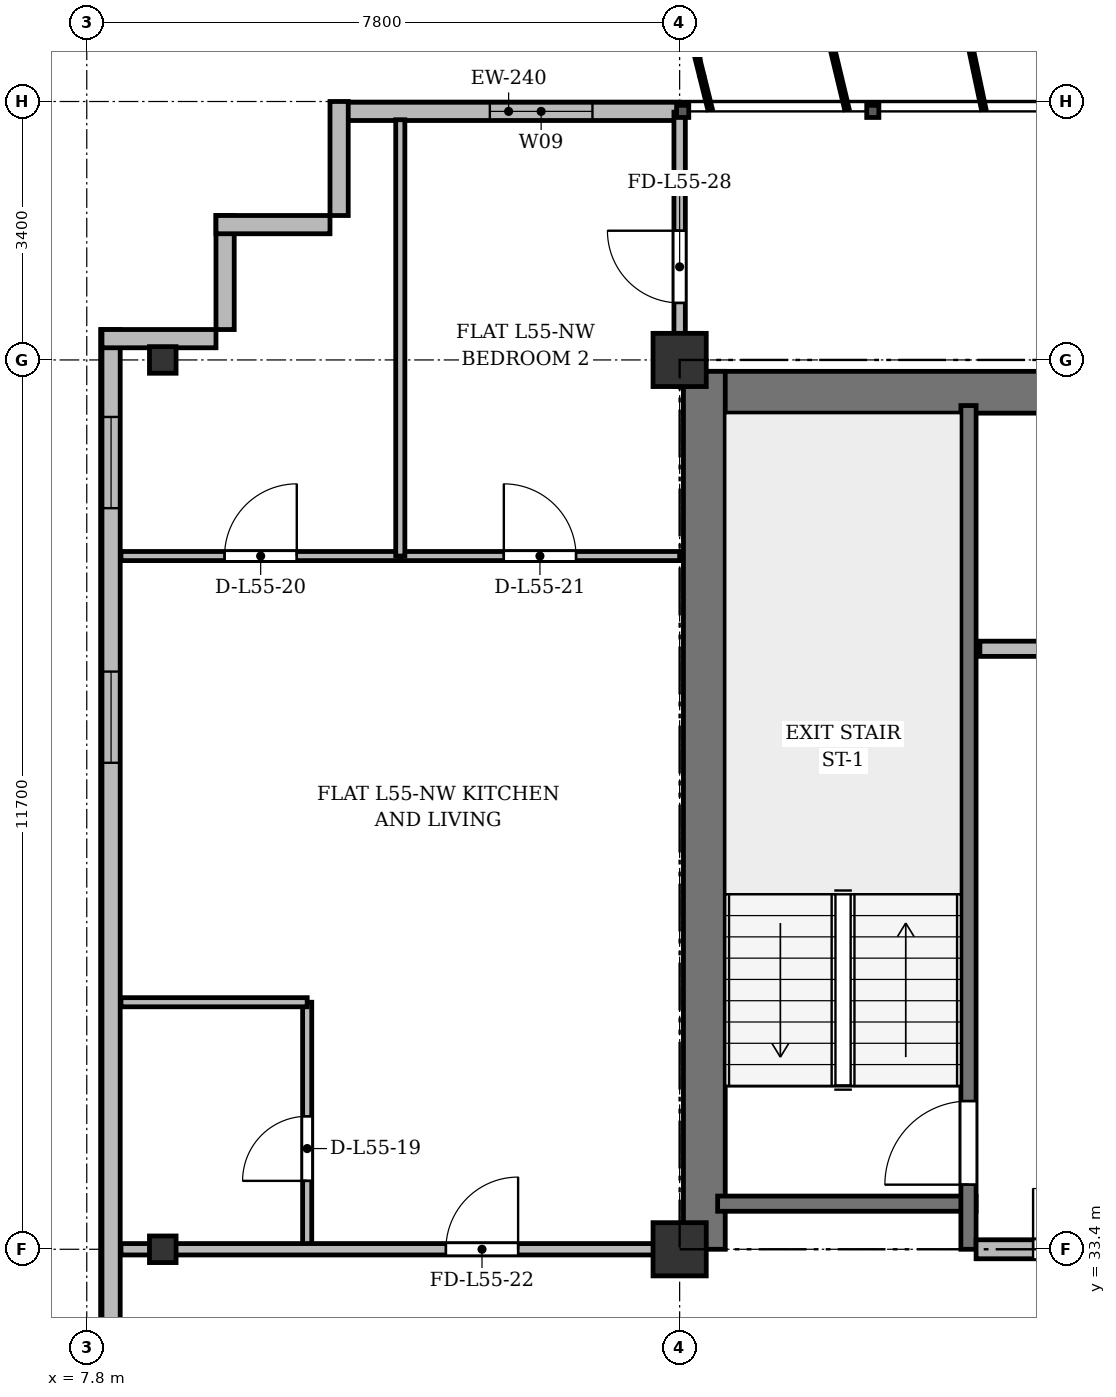
"""IFC4 building model, lengths in metres.
Left out: names, types, materials, properties, quantities, classifications, styles, units other than length and angle.
Written with IfcOpenShell. Run it as: python <this file> out.ifc"""

import sys

from ifc_helpers import new_model, si_unit, direction, frame, frame_2d, origin, origin_2d, place, context, subcontext, project, spatial, rectangle, i_section, extrude, source, transform, mapped, element, fill, save


model = new_model("IFC4")
c1 = context("Model", 3, precision=1e-05, world=origin(), true_north=direction((0.0, 1.0)))
c2 = subcontext(c1, "Body", "Model", "MODEL_VIEW")
j1 = project(units=[si_unit("LENGTHUNIT", "METRE"), si_unit("PLANEANGLEUNIT", "RADIAN")], contexts=[c1])
p1 = place(None, origin())
s1 = spatial("IfcSite", under=j1, at=p1, CompositionType="ELEMENT")
p2 = place(p1, origin())
s2 = spatial("IfcBuilding", under=s1, at=p2, CompositionType="ELEMENT")
p3 = place(p2, frame((0.0, 0.0, 212.1)))
s3 = spatial("IfcBuildingStorey", under=s2, at=p3, CompositionType="ELEMENT", Elevation=212.1)
m1 = source(origin(), c2, "Body", "SweptSolid", [
    extrude(i_section(OverallWidth=0.35, OverallDepth=0.35, WebThickness=0.018, FlangeThickness=0.028, at=origin_2d()), origin(), (0.0, 0.0, 1.0), 3.6),
])
for number, where, z_axis, x_axis in (
    (1, (8.8, 33.4, 0.0), (0.0, 0.0, 1.0), (1.0, 0.0, 0.0)),
    (2, (8.8, 45.1, 0.0), (0.0, 0.0, 1.0), (1.0, 0.0, 0.0)),
):
    element("IfcColumn", number, at=place(p3, frame(where, z_axis=z_axis, x_axis=x_axis)), inside=s3, PredefinedType="COLUMN", context=c2, shape_type="MappedRepresentation", body=[
        mapped(m1, transform((0.0, 0.0, 0.0), x_axis=(1.0, 0.0, 0.0), y_axis=(0.0, 1.0, 0.0), z_axis=(0.0, 0.0, 1.0), scale=1.0)),
    ])
m2 = source(origin(), c2, "Body", "SweptSolid", [
    extrude(rectangle(XDim=0.7, YDim=0.7, at=origin_2d()), origin(), (0.0, 0.0, 1.0), 3.6),
])
for number, where, z_axis, x_axis in (
    (3, (15.6, 33.4, 0.0), (0.0, 0.0, 1.0), (1.0, 0.0, 0.0)),
    (4, (15.6, 45.1, 0.0), (0.0, 0.0, 1.0), (1.0, 0.0, 0.0)),
):
    element("IfcColumn", number, at=place(p3, frame(where, z_axis=z_axis, x_axis=x_axis)), inside=s3, PredefinedType="COLUMN", context=c2, shape_type="MappedRepresentation", body=[
        mapped(m2, transform((0.0, 0.0, 0.0), x_axis=(1.0, 0.0, 0.0), y_axis=(0.0, 1.0, 0.0), z_axis=(0.0, 0.0, 1.0), scale=1.0)),
    ])
p4 = place(p3, frame((11.1, 48.37, 0.0), z_axis=(0.0, 0.0, 1.0), x_axis=(1.0, 0.0, 0.0)))
e5 = element("IfcWall", 5, at=p4, inside=s3, PredefinedType="SOLIDWALL", context=c2, shape_type="SweptSolid", body=[
    extrude(rectangle(XDim=4.5, YDim=0.24, at=frame_2d((2.25, 0.0))), origin(), (0.0, 0.0, 1.0), 3.36),
])
p5 = place(p4, frame((2.003, 0.0, 0.9)))
e6 = element("IfcOpeningElement", 6, at=p5, cuts=e5, PredefinedType="OPENING", context=c2, shape_type="SweptSolid", body=[
    extrude(rectangle(XDim=1.35, YDim=1.5, at=frame_2d((0.675, 0.75))), frame((0.0, 0.13, 0.0), z_axis=(0.0, -1.0, 0.0), x_axis=(1.0, 0.0, 0.0)), (0.0, 0.0, 1.0), 0.26),
])
p6 = place(p3, frame((8.12, 6.4, 0.0), z_axis=(0.0, 0.0, 1.0), x_axis=(0.0, 1.0, 0.0)))
e7 = element("IfcWall", 7, at=p6, inside=s3, PredefinedType="SOLIDWALL", context=c2, shape_type="SweptSolid", body=[
    extrude(rectangle(XDim=39.1, YDim=0.24, at=frame_2d((19.55, 0.0))), origin(), (0.0, 0.0, 1.0), 3.36),
])
p7 = place(p6, frame((1.45, 0.0, 0.92)))
e8 = element("IfcOpeningElement", 8, at=p7, cuts=e7, PredefinedType="OPENING", context=c2, shape_type="SweptSolid", body=[
    extrude(rectangle(XDim=1.2, YDim=1.65, at=frame_2d((0.6, 0.825))), frame((0.0, 0.13, 0.0), z_axis=(0.0, -1.0, 0.0), x_axis=(1.0, 0.0, 0.0)), (0.0, 0.0, 1.0), 0.26),
])
p8 = place(p6, frame((3.8, 0.0, 0.92)))
e9 = element("IfcOpeningElement", 9, at=p8, cuts=e7, PredefinedType="OPENING", context=c2, shape_type="SweptSolid", body=[
    extrude(rectangle(XDim=2.4, YDim=2.1, at=frame_2d((1.2, 1.05))), frame((0.0, 0.13, 0.0), z_axis=(0.0, -1.0, 0.0), x_axis=(1.0, 0.0, 0.0)), (0.0, 0.0, 1.0), 0.26),
])
p9 = place(p6, frame((8.0, 0.0, 0.92)))
e10 = element("IfcOpeningElement", 10, at=p9, cuts=e7, PredefinedType="OPENING", context=c2, shape_type="SweptSolid", body=[
    extrude(rectangle(XDim=2.4, YDim=2.1, at=frame_2d((1.2, 1.05))), frame((0.0, 0.13, 0.0), z_axis=(0.0, -1.0, 0.0), x_axis=(1.0, 0.0, 0.0)), (0.0, 0.0, 1.0), 0.26),
])
p10 = place(p6, frame((15.2, 0.0, 0.92)))
e11 = element("IfcOpeningElement", 11, at=p10, cuts=e7, PredefinedType="OPENING", context=c2, shape_type="SweptSolid", body=[
    extrude(rectangle(XDim=2.4, YDim=2.1, at=frame_2d((1.2, 1.05))), frame((0.0, 0.13, 0.0), z_axis=(0.0, -1.0, 0.0), x_axis=(1.0, 0.0, 0.0)), (0.0, 0.0, 1.0), 0.26),
])
p11 = place(p6, frame((33.4, 0.0, 0.92)))
e12 = element("IfcOpeningElement", 12, at=p11, cuts=e7, PredefinedType="OPENING", context=c2, shape_type="SweptSolid", body=[
    extrude(rectangle(XDim=1.2, YDim=1.65, at=frame_2d((0.6, 0.825))), frame((0.0, 0.13, 0.0), z_axis=(0.0, -1.0, 0.0), x_axis=(1.0, 0.0, 0.0)), (0.0, 0.0, 1.0), 0.26),
])
p12 = place(p6, frame((36.75, 0.0, 0.92)))
e13 = element("IfcOpeningElement", 13, at=p12, cuts=e7, PredefinedType="OPENING", context=c2, shape_type="SweptSolid", body=[
    extrude(rectangle(XDim=1.2, YDim=1.65, at=frame_2d((0.6, 0.825))), frame((0.0, 0.13, 0.0), z_axis=(0.0, -1.0, 0.0), x_axis=(1.0, 0.0, 0.0)), (0.0, 0.0, 1.0), 0.26),
])
for number, where, z_axis, x_axis in (
    (14, (8.0, 45.38, 0.0), (0.0, 0.0, 1.0), (1.0, 0.0, 0.0)),
    (15, (9.62, 45.5, 0.0), (0.0, 0.0, 1.0), (0.0, 1.0, 0.0)),
    (16, (9.5, 46.88, 0.0), (0.0, 0.0, 1.0), (1.0, 0.0, 0.0)),
    (17, (11.12, 47.0, 0.0), (0.0, 0.0, 1.0), (0.0, 1.0, 0.0)),
):
    element("IfcWall", number, at=place(p3, frame(where, z_axis=z_axis, x_axis=x_axis)), inside=s3, PredefinedType="SOLIDWALL", context=c2, shape_type="SweptSolid", body=[
        extrude(rectangle(XDim=1.5, YDim=0.24, at=frame_2d((0.75, 0.0))), origin(), (0.0, 0.0, 1.0), 3.36),
    ])
p13 = place(p3, frame((15.65, 44.675, 0.0), z_axis=(0.0, 0.0, 1.0), x_axis=(1.0, 0.0, 0.0)))
e18 = element("IfcWall", 18, at=p13, inside=s3, PredefinedType="SHEAR", context=c2, shape_type="SweptSolid", body=[
    extrude(rectangle(XDim=43.1, YDim=0.55, at=frame_2d((21.55, 0.0))), origin(), (0.0, 0.0, 1.0), 3.36),
])
p14 = place(p3, frame((15.925, 33.4, 0.0), z_axis=(0.0, 0.0, 1.0), x_axis=(0.0, 1.0, 0.0)))
e19 = element("IfcWall", 19, at=p14, inside=s3, PredefinedType="SHEAR", context=c2, shape_type="SweptSolid", body=[
    extrude(rectangle(XDim=11.55, YDim=0.55, at=frame_2d((5.775, 0.0))), origin(), (0.0, 0.0, 1.0), 3.36),
])
p15 = place(p3, frame((16.1, 34.0, 0.0), z_axis=(0.0, 0.0, 1.0), x_axis=(1.0, 0.0, 0.0)))
e20 = element("IfcWall", 20, at=p15, inside=s3, PredefinedType="SHEAR", context=c2, shape_type="SweptSolid", body=[
    extrude(rectangle(XDim=3.4, YDim=0.2, at=frame_2d((1.7, 0.0))), origin(), (0.0, 0.0, 1.0), 3.36),
])
p16 = place(p3, frame((19.4, 33.4, 0.0), z_axis=(0.0, 0.0, 1.0), x_axis=(0.0, 1.0, 0.0)))
e21 = element("IfcWall", 21, at=p16, inside=s3, PredefinedType="SHEAR", context=c2, shape_type="SweptSolid", body=[
    extrude(rectangle(XDim=11.1, YDim=0.2, at=frame_2d((5.55, 0.0))), origin(), (0.0, 0.0, 1.0), 3.36),
])
p17 = place(p16, frame((0.85, 0.0, 0.0)))
e22 = element("IfcOpeningElement", 22, at=p17, cuts=e21, PredefinedType="OPENING", context=c2, shape_type="SweptSolid", body=[
    extrude(rectangle(XDim=1.1, YDim=2.15, at=frame_2d((0.55, 1.075))), frame((0.0, 0.11, 0.0), z_axis=(0.0, -1.0, 0.0), x_axis=(1.0, 0.0, 0.0)), (0.0, 0.0, 1.0), 0.22),
])
p18 = place(p3, frame((19.55, 41.3, 0.0), z_axis=(0.0, 0.0, 1.0), x_axis=(1.0, 0.0, 0.0)))
e23 = element("IfcWall", 23, at=p18, inside=s3, PredefinedType="SOLIDWALL", context=c2, shape_type="SweptSolid", body=[
    extrude(rectangle(XDim=6.75, YDim=0.2, at=frame_2d((3.375, 0.0))), origin(), (0.0, 0.0, 1.0), 3.36),
])
p19 = place(p18, frame((1.7, 0.0, 0.0)))
e24 = element("IfcOpeningElement", 24, at=p19, cuts=e23, PredefinedType="OPENING", context=c2, shape_type="SweptSolid", body=[
    extrude(rectangle(XDim=1.1, YDim=2.15, at=frame_2d((0.55, 1.075))), frame((0.0, 0.11, 0.0), z_axis=(0.0, -1.0, 0.0), x_axis=(1.0, 0.0, 0.0)), (0.0, 0.0, 1.0), 0.22),
])
p20 = place(p18, frame((4.4, 0.0, 0.0)))
e25 = element("IfcOpeningElement", 25, at=p20, cuts=e23, PredefinedType="OPENING", context=c2, shape_type="SweptSolid", body=[
    extrude(rectangle(XDim=1.1, YDim=2.15, at=frame_2d((0.55, 1.075))), frame((0.0, 0.11, 0.0), z_axis=(0.0, -1.0, 0.0), x_axis=(1.0, 0.0, 0.0)), (0.0, 0.0, 1.0), 0.22),
])
p21 = place(p3, frame((19.5, 33.4, 0.0), z_axis=(0.0, 0.0, 1.0), x_axis=(1.0, 0.0, 0.0)))
e26 = element("IfcWall", 26, at=p21, inside=s3, PredefinedType="PARTITIONING", context=c2, shape_type="SweptSolid", body=[
    extrude(rectangle(XDim=6.8, YDim=0.25, at=frame_2d((3.4, 0.0))), origin(), (0.0, 0.0, 1.0), 2.91),
])
p22 = place(p21, frame((0.75, 0.0, 0.0)))
e27 = element("IfcOpeningElement", 27, at=p22, cuts=e26, PredefinedType="OPENING", context=c2, shape_type="SweptSolid", body=[
    extrude(rectangle(XDim=1.6, YDim=2.2, at=frame_2d((0.8, 1.1))), frame((0.0, 0.135, 0.0), z_axis=(0.0, -1.0, 0.0), x_axis=(1.0, 0.0, 0.0)), (0.0, 0.0, 1.0), 0.27),
])
p23 = place(p3, frame((10.7, 33.4, 0.0), z_axis=(0.0, 0.0, 1.0), x_axis=(0.0, 1.0, 0.0)))
e28 = element("IfcWall", 28, at=p23, inside=s3, PredefinedType="PARTITIONING", context=c2, shape_type="SweptSolid", body=[
    extrude(rectangle(XDim=3.25, YDim=0.12, at=frame_2d((1.625, 0.0))), origin(), (0.0, 0.0, 1.0), 2.91),
])
p24 = place(p23, frame((0.9, 0.0, 0.0)))
e29 = element("IfcOpeningElement", 29, at=p24, cuts=e28, PredefinedType="OPENING", context=c2, shape_type="SweptSolid", body=[
    extrude(rectangle(XDim=0.85, YDim=2.1, at=frame_2d((0.425, 1.05))), frame((0.0, 0.07, 0.0), z_axis=(0.0, -1.0, 0.0), x_axis=(1.0, 0.0, 0.0)), (0.0, 0.0, 1.0), 0.14),
])
p25 = place(p3, frame((8.25, 36.65, 0.0), z_axis=(0.0, 0.0, 1.0), x_axis=(1.0, 0.0, 0.0)))
e30 = element("IfcWall", 30, at=p25, inside=s3, PredefinedType="PARTITIONING", context=c2, shape_type="SweptSolid", body=[
    extrude(rectangle(XDim=2.45, YDim=0.12, at=frame_2d((1.225, 0.0))), origin(), (0.0, 0.0, 1.0), 2.86),
])
p26 = place(p3, frame((8.25, 42.52, 0.0), z_axis=(0.0, 0.0, 1.0), x_axis=(1.0, 0.0, 0.0)))
e31 = element("IfcWall", 31, at=p26, inside=s3, PredefinedType="PARTITIONING", context=c2, shape_type="SweptSolid", body=[
    extrude(rectangle(XDim=3.675, YDim=0.12, at=frame_2d((1.837, 0.0))), origin(), (0.0, 0.0, 1.0), 2.86),
])
p27 = place(p26, frame((1.363, 0.0, 0.0)))
e32 = element("IfcOpeningElement", 32, at=p27, cuts=e31, PredefinedType="OPENING", context=c2, shape_type="SweptSolid", body=[
    extrude(rectangle(XDim=0.95, YDim=2.15, at=frame_2d((0.475, 1.075))), frame((0.0, 0.07, 0.0), z_axis=(0.0, -1.0, 0.0), x_axis=(1.0, 0.0, 0.0)), (0.0, 0.0, 1.0), 0.14),
])
p28 = place(p3, frame((11.925, 42.52, 0.0), z_axis=(0.0, 0.0, 1.0), x_axis=(1.0, 0.0, 0.0)))
e33 = element("IfcWall", 33, at=p28, inside=s3, PredefinedType="PARTITIONING", context=c2, shape_type="SweptSolid", body=[
    extrude(rectangle(XDim=3.675, YDim=0.12, at=frame_2d((1.837, 0.0))), origin(), (0.0, 0.0, 1.0), 2.86),
])
p29 = place(p28, frame((1.362, 0.0, 0.0)))
e34 = element("IfcOpeningElement", 34, at=p29, cuts=e33, PredefinedType="OPENING", context=c2, shape_type="SweptSolid", body=[
    extrude(rectangle(XDim=0.95, YDim=2.15, at=frame_2d((0.475, 1.075))), frame((0.0, 0.07, 0.0), z_axis=(0.0, -1.0, 0.0), x_axis=(1.0, 0.0, 0.0)), (0.0, 0.0, 1.0), 0.14),
])
p30 = place(p3, frame((11.925, 42.52, 0.0), z_axis=(0.0, 0.0, 1.0), x_axis=(0.0, 1.0, 0.0)))
e35 = element("IfcWall", 35, at=p30, inside=s3, PredefinedType="PARTITIONING", context=c2, shape_type="SweptSolid", body=[
    extrude(rectangle(XDim=5.74, YDim=0.12, at=frame_2d((2.87, 0.0))), origin(), (0.0, 0.0, 1.0), 2.91),
])
p31 = place(p3, frame((8.25, 33.4, 0.0), z_axis=(0.0, 0.0, 1.0), x_axis=(1.0, 0.0, 0.0)))
e36 = element("IfcWall", 36, at=p31, inside=s3, PredefinedType="PARTITIONING", context=c2, shape_type="SweptSolid", body=[
    extrude(rectangle(XDim=7.35, YDim=0.15, at=frame_2d((3.675, 0.0))), origin(), (0.0, 0.0, 1.0), 2.91),
])
p32 = place(p31, frame((4.275, 0.0, 0.0)))
e37 = element("IfcOpeningElement", 37, at=p32, cuts=e36, PredefinedType="OPENING", context=c2, shape_type="SweptSolid", body=[
    extrude(rectangle(XDim=0.95, YDim=2.15, at=frame_2d((0.475, 1.075))), frame((0.0, 0.085, 0.0), z_axis=(0.0, -1.0, 0.0), x_axis=(1.0, 0.0, 0.0)), (0.0, 0.0, 1.0), 0.17),
])
p33 = place(p3, frame((15.6, 44.75, 0.0), z_axis=(0.0, 0.0, 1.0), x_axis=(0.0, 1.0, 0.0)))
e38 = element("IfcWall", 38, at=p33, inside=s3, PredefinedType="PARTITIONING", context=c2, shape_type="SweptSolid", body=[
    extrude(rectangle(XDim=3.61, YDim=0.15, at=frame_2d((1.805, 0.0))), origin(), (0.0, 0.0, 1.0), 2.86),
])
p34 = place(p33, frame((1.1, 0.0, 0.0)))
e39 = element("IfcOpeningElement", 39, at=p34, cuts=e38, PredefinedType="OPENING", context=c2, shape_type="SweptSolid", body=[
    extrude(rectangle(XDim=0.95, YDim=2.15, at=frame_2d((0.475, 1.075))), frame((0.0, 0.085, 0.0), z_axis=(0.0, -1.0, 0.0), x_axis=(1.0, 0.0, 0.0)), (0.0, 0.0, 1.0), 0.17),
])
m3 = source(origin(), c2, "Body", "SweptSolid", [
    extrude(rectangle(XDim=1.35, YDim=1.5, at=frame_2d((0.675, 0.75))), frame((0.0, 0.03, 0.0), z_axis=(0.0, -1.0, 0.0), x_axis=(1.0, 0.0, 0.0)), (0.0, 0.0, 1.0), 0.06),
])
p35 = place(p5, origin())
e40 = element("IfcWindow", 40, at=p35, inside=s3, PartitioningType="SINGLE_PANEL", PredefinedType="WINDOW", context=c2, shape_type="MappedRepresentation", body=[
    mapped(m3, transform((0.0, 0.0, 0.0), x_axis=(1.0, 0.0, 0.0), y_axis=(0.0, 1.0, 0.0), z_axis=(0.0, 0.0, 1.0), scale=1.0)),
])
fill(e6, e40)
m4 = source(origin(), c2, "Body", "SweptSolid", [
    extrude(rectangle(XDim=1.2, YDim=1.65, at=frame_2d((0.6, 0.825))), frame((0.0, 0.03, 0.0), z_axis=(0.0, -1.0, 0.0), x_axis=(1.0, 0.0, 0.0)), (0.0, 0.0, 1.0), 0.06),
])
p36 = place(p11, origin())
e41 = element("IfcWindow", 41, at=p36, inside=s3, PartitioningType="SINGLE_PANEL", PredefinedType="WINDOW", context=c2, shape_type="MappedRepresentation", body=[
    mapped(m4, transform((0.0, 0.0, 0.0), x_axis=(1.0, 0.0, 0.0), y_axis=(0.0, 1.0, 0.0), z_axis=(0.0, 0.0, 1.0), scale=1.0)),
])
fill(e12, e41)
p37 = place(p12, origin())
e42 = element("IfcWindow", 42, at=p37, inside=s3, PartitioningType="SINGLE_PANEL", PredefinedType="WINDOW", context=c2, shape_type="MappedRepresentation", body=[
    mapped(m4, transform((0.0, 0.0, 0.0), x_axis=(1.0, 0.0, 0.0), y_axis=(0.0, 1.0, 0.0), z_axis=(0.0, 0.0, 1.0), scale=1.0)),
])
fill(e13, e42)
m5 = source(origin(), c2, "Body", "SweptSolid", [
    extrude(rectangle(XDim=1.1, YDim=2.15, at=frame_2d((0.55, 1.075))), frame((0.0, 0.025, 0.0), z_axis=(0.0, -1.0, 0.0), x_axis=(1.0, 0.0, 0.0)), (0.0, 0.0, 1.0), 0.05),
])
p38 = place(p17, origin())
e43 = element("IfcDoor", 43, at=p38, inside=s3, OperationType="SINGLE_SWING_LEFT", PredefinedType="DOOR", context=c2, shape_type="MappedRepresentation", body=[
    mapped(m5, transform((0.0, 0.0, 0.0), x_axis=(1.0, 0.0, 0.0), y_axis=(0.0, 1.0, 0.0), z_axis=(0.0, 0.0, 1.0), scale=1.0)),
])
fill(e22, e43)
m6 = source(origin(), c2, "Body", "SweptSolid", [
    extrude(rectangle(XDim=1.6, YDim=2.2, at=frame_2d((0.8, 1.1))), frame((0.0, 0.025, 0.0), z_axis=(0.0, -1.0, 0.0), x_axis=(1.0, 0.0, 0.0)), (0.0, 0.0, 1.0), 0.05),
])
p39 = place(p22, origin())
e44 = element("IfcDoor", 44, at=p39, inside=s3, OperationType="DOUBLE_DOOR_SINGLE_SWING", PredefinedType="DOOR", context=c2, shape_type="MappedRepresentation", body=[
    mapped(m6, transform((0.0, 0.0, 0.0), x_axis=(1.0, 0.0, 0.0), y_axis=(0.0, 1.0, 0.0), z_axis=(0.0, 0.0, 1.0), scale=1.0)),
])
fill(e27, e44)
m7 = source(origin(), c2, "Body", "SweptSolid", [
    extrude(rectangle(XDim=0.85, YDim=2.1, at=frame_2d((0.425, 1.05))), frame((0.0, 0.025, 0.0), z_axis=(0.0, -1.0, 0.0), x_axis=(1.0, 0.0, 0.0)), (0.0, 0.0, 1.0), 0.05),
])
p40 = place(p24, origin())
e45 = element("IfcDoor", 45, at=p40, inside=s3, OperationType="SINGLE_SWING_LEFT", PredefinedType="DOOR", context=c2, shape_type="MappedRepresentation", body=[
    mapped(m7, transform((0.0, 0.0, 0.0), x_axis=(1.0, 0.0, 0.0), y_axis=(0.0, 1.0, 0.0), z_axis=(0.0, 0.0, 1.0), scale=1.0)),
])
fill(e29, e45)
m8 = source(origin(), c2, "Body", "SweptSolid", [
    extrude(rectangle(XDim=0.95, YDim=2.15, at=frame_2d((0.475, 1.075))), frame((0.0, 0.025, 0.0), z_axis=(0.0, -1.0, 0.0), x_axis=(1.0, 0.0, 0.0)), (0.0, 0.0, 1.0), 0.05),
])
p41 = place(p27, origin())
e46 = element("IfcDoor", 46, at=p41, inside=s3, OperationType="SINGLE_SWING_RIGHT", PredefinedType="DOOR", context=c2, shape_type="MappedRepresentation", body=[
    mapped(m8, transform((0.0, 0.0, 0.0), x_axis=(1.0, 0.0, 0.0), y_axis=(0.0, 1.0, 0.0), z_axis=(0.0, 0.0, 1.0), scale=1.0)),
])
fill(e32, e46)
p42 = place(p29, origin())
e47 = element("IfcDoor", 47, at=p42, inside=s3, OperationType="SINGLE_SWING_LEFT", PredefinedType="DOOR", context=c2, shape_type="MappedRepresentation", body=[
    mapped(m8, transform((0.0, 0.0, 0.0), x_axis=(1.0, 0.0, 0.0), y_axis=(0.0, 1.0, 0.0), z_axis=(0.0, 0.0, 1.0), scale=1.0)),
])
fill(e34, e47)
p43 = place(p32, origin())
e48 = element("IfcDoor", 48, at=p43, inside=s3, OperationType="SINGLE_SWING_RIGHT", PredefinedType="DOOR", context=c2, shape_type="MappedRepresentation", body=[
    mapped(m8, transform((0.0, 0.0, 0.0), x_axis=(1.0, 0.0, 0.0), y_axis=(0.0, 1.0, 0.0), z_axis=(0.0, 0.0, 1.0), scale=1.0)),
])
fill(e37, e48)
p44 = place(p34, origin())
e49 = element("IfcDoor", 49, at=p44, inside=s3, OperationType="SINGLE_SWING_RIGHT", PredefinedType="DOOR", context=c2, shape_type="MappedRepresentation", body=[
    mapped(m8, transform((0.0, 0.0, 0.0), x_axis=(1.0, 0.0, 0.0), y_axis=(0.0, 1.0, 0.0), z_axis=(0.0, 0.0, 1.0), scale=1.0)),
])
fill(e39, e49)
save(model, sys.argv[1])
